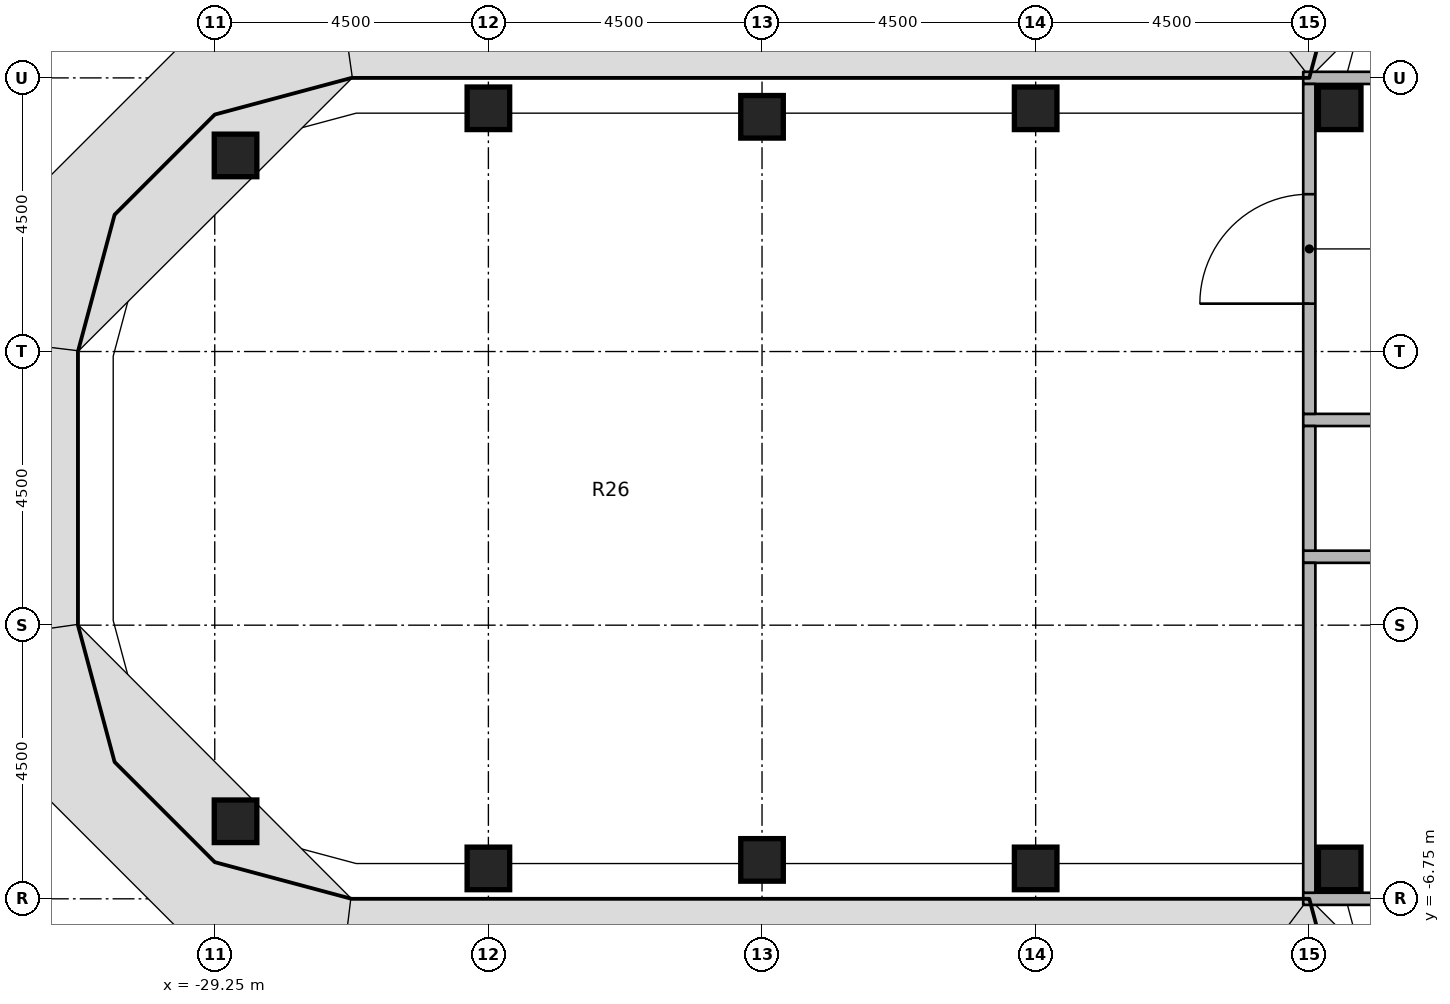
"""IFC4 building model, lengths in metres.
Left out: names, types, materials, properties, quantities, classifications, styles, units other than length and angle.
Written with IfcOpenShell. Run it as: python <this file> out.ifc"""

import sys

from ifc_helpers import new_model, si_unit, direction, frame, frame_2d, origin, origin_2d, place, context, subcontext, project, spatial, rectangle, extrude, element, fill, save


model = new_model("IFC4")
c1 = context("Model", 3, precision=1e-05, world=origin(), true_north=direction((0.0, 1.0)))
c2 = subcontext(c1, "Body", "Model", "MODEL_VIEW")
j1 = project(units=[si_unit("LENGTHUNIT", "METRE"), si_unit("PLANEANGLEUNIT", "RADIAN")], contexts=[c1])
p1 = place(None, origin())
s1 = spatial("IfcSite", under=j1, at=p1, CompositionType="ELEMENT")
p2 = place(p1, origin())
s2 = spatial("IfcBuilding", under=s1, at=p2, CompositionType="ELEMENT")
p3 = place(p2, frame((0.0, 0.0, 233.4)))
s3 = spatial("IfcBuildingStorey", under=s2, at=p3, CompositionType="ELEMENT", Elevation=233.4)
for number, where, z_axis, x_axis in (
    (1, (-28.908, -5.475, 0.0), (0.0, 0.0, 1.0), (1.0, 0.0, 0.0)),
    (2, (-28.908, 5.475, 0.0), (0.0, 0.0, 1.0), (1.0, 0.0, 0.0)),
    (3, (-24.75, -6.25, 0.0), (0.0, 0.0, 1.0), (1.0, 0.0, 0.0)),
    (4, (-24.75, 6.25, 0.0), (0.0, 0.0, 1.0), (1.0, 0.0, 0.0)),
    (5, (-20.25, -6.11, 0.0), (0.0, 0.0, 1.0), (1.0, 0.0, 0.0)),
    (6, (-20.25, 6.11, 0.0), (0.0, 0.0, 1.0), (1.0, 0.0, 0.0)),
    (7, (-15.75, -6.25, 0.0), (0.0, 0.0, 1.0), (1.0, 0.0, 0.0)),
    (8, (-15.75, 6.25, 0.0), (0.0, 0.0, 1.0), (1.0, 0.0, 0.0)),
    (9, (-10.75, -6.25, 0.0), (0.0, 0.0, 1.0), (1.0, 0.0, 0.0)),
    (10, (-10.75, 6.25, 0.0), (0.0, 0.0, 1.0), (1.0, 0.0, 0.0)),
):
    element("IfcColumn", number, at=place(p3, frame(where, z_axis=z_axis, x_axis=x_axis)), inside=s3, PredefinedType="COLUMN", context=c2, shape_type="SweptSolid", body=[
        extrude(rectangle(XDim=0.7, YDim=0.7, at=origin_2d()), origin(), (0.0, 0.0, 1.0), 3.65),
    ])
p4 = place(p3, frame((-11.35, 1.125, 0.0), z_axis=(0.0, 0.0, 1.0), x_axis=(1.0, 0.0, 0.0)))
e11 = element("IfcWall", 11, at=p4, inside=s3, PredefinedType="PARTITIONING", context=c2, shape_type="SweptSolid", body=[
    extrude(rectangle(XDim=4.7, YDim=0.2, at=frame_2d((2.35, 0.0))), origin(), (0.0, 0.0, 1.0), 2.746),
])
p5 = place(p4, frame((1.85, 0.0, 0.0)))
e12 = element("IfcOpeningElement", 12, at=p5, cuts=e11, PredefinedType="OPENING", context=c2, shape_type="SweptSolid", body=[
    extrude(rectangle(XDim=1.0, YDim=2.1, at=frame_2d((0.5, 1.05))), frame((0.0, 0.11, 0.0), z_axis=(0.0, -1.0, 0.0), x_axis=(1.0, 0.0, 0.0)), (0.0, 0.0, 1.0), 0.22),
])
p6 = place(p3, frame((-6.65, -1.125, 0.0), z_axis=(0.0, 0.0, 1.0), x_axis=(-1.0, 0.0, 0.0)))
e13 = element("IfcWall", 13, at=p6, inside=s3, PredefinedType="PARTITIONING", context=c2, shape_type="SweptSolid", body=[
    extrude(rectangle(XDim=4.7, YDim=0.2, at=frame_2d((2.35, 0.0))), origin(), (0.0, 0.0, 1.0), 2.746),
])
p7 = place(p6, frame((1.85, 0.0, 0.0)))
e14 = element("IfcOpeningElement", 14, at=p7, cuts=e13, PredefinedType="OPENING", context=c2, shape_type="SweptSolid", body=[
    extrude(rectangle(XDim=1.0, YDim=2.1, at=frame_2d((0.5, 1.05))), frame((0.0, 0.11, 0.0), z_axis=(0.0, -1.0, 0.0), x_axis=(1.0, 0.0, 0.0)), (0.0, 0.0, 1.0), 0.22),
])
p8 = place(p3, frame((-11.25, -1.025, 0.0), z_axis=(0.0, 0.0, 1.0), x_axis=(0.0, 1.0, 0.0)))
e15 = element("IfcWall", 15, at=p8, inside=s3, PredefinedType="PARTITIONING", context=c2, shape_type="SweptSolid", body=[
    extrude(rectangle(XDim=2.05, YDim=0.2, at=frame_2d((1.025, 0.0))), origin(), (0.0, 0.0, 1.0), 2.746),
])
p9 = place(p3, frame((-11.35, 6.75, 0.0), z_axis=(0.0, 0.0, 1.0), x_axis=(1.0, 0.0, 0.0)))
e16 = element("IfcWall", 16, at=p9, inside=s3, PredefinedType="PARTITIONING", context=c2, shape_type="SweptSolid", body=[
    extrude(rectangle(XDim=4.7, YDim=0.2, at=frame_2d((2.35, 0.0))), origin(), (0.0, 0.0, 1.0), 2.746),
])
p10 = place(p3, frame((-11.25, 1.225, 0.0), z_axis=(0.0, 0.0, 1.0), x_axis=(0.0, 1.0, 0.0)))
e17 = element("IfcWall", 17, at=p10, inside=s3, PredefinedType="PARTITIONING", context=c2, shape_type="SweptSolid", body=[
    extrude(rectangle(XDim=5.425, YDim=0.2, at=frame_2d((2.712, 0.0))), origin(), (0.0, 0.0, 1.0), 2.746),
])
p11 = place(p10, frame((1.812, 0.0, 0.0)))
e18 = element("IfcOpeningElement", 18, at=p11, cuts=e17, PredefinedType="OPENING", context=c2, shape_type="SweptSolid", body=[
    extrude(rectangle(XDim=1.8, YDim=2.1, at=frame_2d((0.9, 1.05))), frame((0.0, 0.11, 0.0), z_axis=(0.0, -1.0, 0.0), x_axis=(1.0, 0.0, 0.0)), (0.0, 0.0, 1.0), 0.22),
])
p12 = place(p3, frame((-11.35, -6.75, 0.0), z_axis=(0.0, 0.0, 1.0), x_axis=(1.0, 0.0, 0.0)))
e19 = element("IfcWall", 19, at=p12, inside=s3, PredefinedType="PARTITIONING", context=c2, shape_type="SweptSolid", body=[
    extrude(rectangle(XDim=4.7, YDim=0.2, at=frame_2d((2.35, 0.0))), origin(), (0.0, 0.0, 1.0), 2.746),
])
p13 = place(p3, frame((-11.25, -6.65, 0.0), z_axis=(0.0, 0.0, 1.0), x_axis=(0.0, 1.0, 0.0)))
e20 = element("IfcWall", 20, at=p13, inside=s3, PredefinedType="PARTITIONING", context=c2, shape_type="SweptSolid", body=[
    extrude(rectangle(XDim=5.425, YDim=0.2, at=frame_2d((2.712, 0.0))), origin(), (0.0, 0.0, 1.0), 2.746),
])
p14 = place(p11, origin())
e21 = element("IfcDoor", 21, at=p14, inside=s3, OperationType="DOUBLE_DOOR_SINGLE_SWING", PredefinedType="DOOR", context=c2, shape_type="SweptSolid", body=[
    extrude(rectangle(XDim=1.8, YDim=2.1, at=frame_2d((0.9, 1.05))), frame((0.0, 0.025, 0.0), z_axis=(0.0, -1.0, 0.0), x_axis=(1.0, 0.0, 0.0)), (0.0, 0.0, 1.0), 0.05),
])
fill(e18, e21)
save(model, sys.argv[1])
